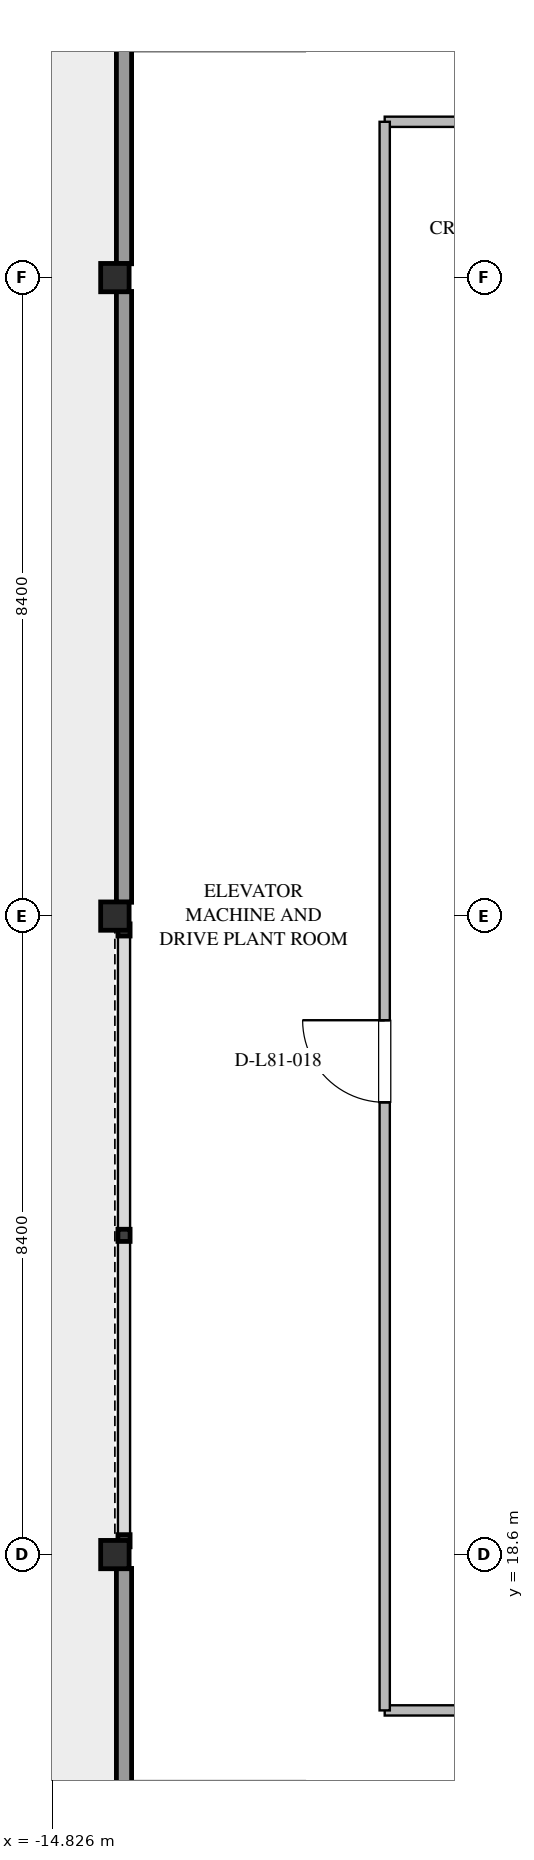
"""IFC4 building model, lengths in metres.
Left out: names, types, materials, properties, quantities, classifications, styles, units other than length and angle.
Written with IfcOpenShell. Run it as: python <this file> out.ifc"""

import sys

from ifc_helpers import new_model, si_unit, direction, frame, frame_2d, origin, origin_2d, place, context, subcontext, project, spatial, rectangle, i_section, extrude, element, fill, save


model = new_model("IFC4")
c1 = context("Model", 3, precision=1e-05, world=origin(), true_north=direction((0.0, 1.0)))
c2 = subcontext(c1, "Body", "Model", "MODEL_VIEW")
j1 = project(units=[si_unit("LENGTHUNIT", "METRE"), si_unit("PLANEANGLEUNIT", "RADIAN")], contexts=[c1])
p1 = place(None, origin())
s1 = spatial("IfcSite", under=j1, at=p1, CompositionType="ELEMENT")
p2 = place(p1, origin())
s2 = spatial("IfcBuilding", under=s1, at=p2, CompositionType="ELEMENT")
p3 = place(p2, frame((0.0, 0.0, 311.4)))
s3 = spatial("IfcBuildingStorey", under=s2, at=p3, CompositionType="ELEMENT", Elevation=311.4)
for number, where, z_axis, x_axis in (
    (1, (-14.0, 18.6, -0.32), (0.0, 0.0, 1.0), (1.0, 0.0, 0.0)),
    (2, (-14.0, 27.0, -0.32), (0.0, 0.0, 1.0), (1.0, 0.0, 0.0)),
    (3, (-14.0, 35.4, -0.32), (0.0, 0.0, 1.0), (1.0, 0.0, 0.0)),
):
    element("IfcColumn", number, at=place(p3, frame(where, z_axis=z_axis, x_axis=x_axis)), inside=s3, PredefinedType="COLUMN", context=c2, shape_type="SweptSolid", body=[
        extrude(i_section(OverallWidth=0.374, OverallDepth=0.372, WebThickness=0.016, FlangeThickness=0.026, FilletRadius=0.025, at=origin_2d()), origin(), (0.0, 0.0, 1.0), 4.317),
    ])
p4 = place(p3, frame((-10.45, 16.55, 0.0), z_axis=(0.0, 0.0, 1.0), x_axis=(1.0, 0.0, 0.0)))
e4 = element("IfcWall", 4, at=p4, inside=s3, PredefinedType="PARTITIONING", context=c2, shape_type="SweptSolid", body=[
    extrude(rectangle(XDim=20.9, YDim=0.135, at=frame_2d((10.45, 0.0))), origin(), (0.0, 0.0, 1.0), 3.68),
])
p5 = place(p4, frame((3.0, 0.0, 0.0)))
e5 = element("IfcOpeningElement", 5, at=p5, cuts=e4, PredefinedType="OPENING", context=c2, shape_type="SweptSolid", body=[
    extrude(rectangle(XDim=1.08, YDim=2.04, at=frame_2d((0.54, 1.02))), frame((0.0, 0.077, 0.0), z_axis=(0.0, -1.0, 0.0), x_axis=(1.0, 0.0, 0.0)), (0.0, 0.0, 1.0), 0.155),
])
p6 = place(p4, frame((15.0, 0.0, 0.0)))
e6 = element("IfcOpeningElement", 6, at=p6, cuts=e4, PredefinedType="OPENING", context=c2, shape_type="SweptSolid", body=[
    extrude(rectangle(XDim=1.08, YDim=2.04, at=frame_2d((0.54, 1.02))), frame((0.0, 0.077, 0.0), z_axis=(0.0, -1.0, 0.0), x_axis=(1.0, 0.0, 0.0)), (0.0, 0.0, 1.0), 0.155),
])
p7 = place(p3, frame((-10.45, 37.45, 0.0), z_axis=(0.0, 0.0, 1.0), x_axis=(1.0, 0.0, 0.0)))
e7 = element("IfcWall", 7, at=p7, inside=s3, PredefinedType="PARTITIONING", context=c2, shape_type="SweptSolid", body=[
    extrude(rectangle(XDim=20.9, YDim=0.135, at=frame_2d((10.45, 0.0))), origin(), (0.0, 0.0, 1.0), 3.68),
])
p8 = place(p7, frame((3.0, 0.0, 0.0)))
e8 = element("IfcOpeningElement", 8, at=p8, cuts=e7, PredefinedType="OPENING", context=c2, shape_type="SweptSolid", body=[
    extrude(rectangle(XDim=1.08, YDim=2.04, at=frame_2d((0.54, 1.02))), frame((0.0, 0.077, 0.0), z_axis=(0.0, -1.0, 0.0), x_axis=(1.0, 0.0, 0.0)), (0.0, 0.0, 1.0), 0.155),
])
p9 = place(p7, frame((15.0, 0.0, 0.0)))
e9 = element("IfcOpeningElement", 9, at=p9, cuts=e7, PredefinedType="OPENING", context=c2, shape_type="SweptSolid", body=[
    extrude(rectangle(XDim=1.08, YDim=2.04, at=frame_2d((0.54, 1.02))), frame((0.0, 0.077, 0.0), z_axis=(0.0, -1.0, 0.0), x_axis=(1.0, 0.0, 0.0)), (0.0, 0.0, 1.0), 0.155),
])
p10 = place(p3, frame((-10.45, 16.55, 0.0), z_axis=(0.0, 0.0, 1.0), x_axis=(0.0, 1.0, 0.0)))
e10 = element("IfcWall", 10, at=p10, inside=s3, PredefinedType="PARTITIONING", context=c2, shape_type="SweptSolid", body=[
    extrude(rectangle(XDim=20.9, YDim=0.135, at=frame_2d((10.45, 0.0))), origin(), (0.0, 0.0, 1.0), 3.68),
])
p11 = place(p10, frame((8.0, 0.0, 0.0)))
e11 = element("IfcOpeningElement", 11, at=p11, cuts=e10, PredefinedType="OPENING", context=c2, shape_type="SweptSolid", body=[
    extrude(rectangle(XDim=1.08, YDim=2.04, at=frame_2d((0.54, 1.02))), frame((0.0, 0.077, 0.0), z_axis=(0.0, -1.0, 0.0), x_axis=(1.0, 0.0, 0.0)), (0.0, 0.0, 1.0), 0.155),
])
p12 = place(p11, origin())
e12 = element("IfcDoor", 12, at=p12, inside=s3, OperationType="SINGLE_SWING_RIGHT", PredefinedType="DOOR", context=c2, shape_type="SweptSolid", body=[
    extrude(rectangle(XDim=1.08, YDim=2.04, at=frame_2d((0.54, 1.02))), frame((0.0, 0.025, 0.0), z_axis=(0.0, -1.0, 0.0), x_axis=(1.0, 0.0, 0.0)), (0.0, 0.0, 1.0), 0.05),
])
fill(e11, e12)
save(model, sys.argv[1])
